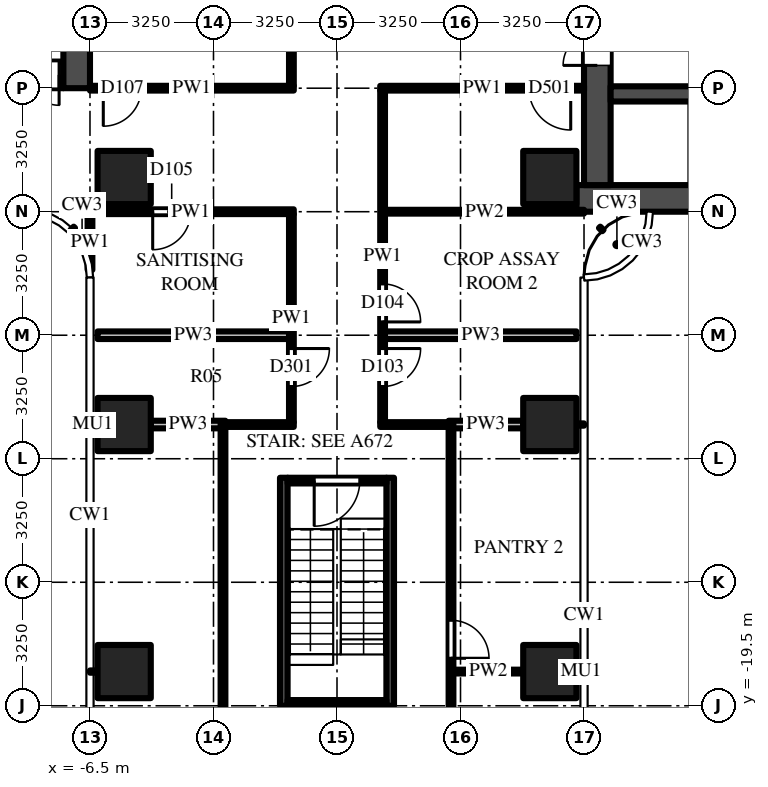
"""IFC4 building model, lengths in metres.
Left out: names, types, materials, properties, quantities, classifications, styles, units other than length and angle.
Written with IfcOpenShell. Run it as: python <this file> out.ifc"""

import sys

from ifc_helpers import new_model, si_unit, direction, frame, frame_2d, origin, origin_2d, place, context, subcontext, project, spatial, rectangle, extrude, source, transform, mapped, element, fill, save


model = new_model("IFC4")
c1 = context("Model", 3, precision=1e-05, world=origin(), true_north=direction((0.0, 1.0)))
c2 = subcontext(c1, "Body", "Model", "MODEL_VIEW")
j1 = project(units=[si_unit("LENGTHUNIT", "METRE"), si_unit("PLANEANGLEUNIT", "RADIAN")], contexts=[c1])
p1 = place(None, origin())
s1 = spatial("IfcSite", under=j1, at=p1, CompositionType="ELEMENT")
p2 = place(p1, origin())
s2 = spatial("IfcBuilding", under=s1, at=p2, CompositionType="ELEMENT")
p3 = place(p2, frame((0.0, 0.0, 52.0)))
s3 = spatial("IfcBuildingStorey", under=s2, at=p3, CompositionType="ELEMENT", Elevation=52.0)
m1 = source(origin(), c2, "Body", "SweptSolid", [
    extrude(rectangle(XDim=1.4, YDim=1.4, at=origin_2d()), origin(), (0.0, 0.0, 1.0), 4.5),
])
for number, where, z_axis, x_axis in (
    (1, (5.6, -5.6, 0.0), (0.0, 0.0, 1.0), (1.0, 0.0, 0.0)),
    (2, (-5.6, -5.6, 0.0), (0.0, 0.0, 1.0), (1.0, 0.0, 0.0)),
    (3, (5.6, -12.1, 0.0), (0.0, 0.0, 1.0), (1.0, 0.0, 0.0)),
    (4, (5.6, -18.6, 0.0), (0.0, 0.0, 1.0), (1.0, 0.0, 0.0)),
    (5, (-5.6, -12.1, 0.0), (0.0, 0.0, 1.0), (1.0, 0.0, 0.0)),
    (6, (-5.6, -18.6, 0.0), (0.0, 0.0, 1.0), (1.0, 0.0, 0.0)),
):
    element("IfcColumn", number, at=place(p3, frame(where, z_axis=z_axis, x_axis=x_axis)), inside=s3, PredefinedType="COLUMN", context=c2, shape_type="MappedRepresentation", body=[
        mapped(m1, transform((0.0, 0.0, 0.0))),
    ])
m2 = source(origin(), c2, "Body", "SweptSolid", [
    extrude(rectangle(XDim=16.45, YDim=0.7, at=frame_2d((8.225, 0.0))), origin(), (0.0, 0.0, 1.0), 4.25),
])
p4 = place(p3, frame((6.3, -6.15, 0.0), z_axis=(0.0, 0.0, 1.0), x_axis=(1.0, 0.0, 0.0)))
e7 = element("IfcWall", 7, at=p4, inside=s3, PredefinedType="SHEAR", context=c2, shape_type="MappedRepresentation", body=[
    mapped(m2, transform((0.0, 0.0, 0.0))),
])
m3 = source(origin(), c2, "Body", "SweptSolid", [
    extrude(rectangle(XDim=9.05, YDim=0.7, at=frame_2d((4.525, 0.0))), origin(), (0.0, 0.0, 1.0), 4.25),
])
p5 = place(p3, frame((6.85, -5.8, 0.0), z_axis=(0.0, 0.0, 1.0), x_axis=(0.0, 1.0, 0.0)))
e8 = element("IfcWall", 8, at=p5, inside=s3, PredefinedType="SHEAR", context=c2, shape_type="MappedRepresentation", body=[
    mapped(m3, transform((0.0, 0.0, 0.0))),
])
m4 = source(origin(), c2, "Body", "SweptSolid", [
    extrude(rectangle(XDim=1.8, YDim=2.1, at=frame_2d((0.9, 1.05))), frame((0.0, 0.36, 0.0), z_axis=(0.0, -1.0, 0.0), x_axis=(1.0, 0.0, 0.0)), (0.0, 0.0, 1.0), 0.72),
])
p6 = place(p5, frame((3.15, 0.0, 0.0)))
e9 = element("IfcOpeningElement", 9, at=p6, cuts=e8, PredefinedType="OPENING", context=c2, shape_type="MappedRepresentation", body=[
    mapped(m4, transform((0.0, 0.0, 0.0))),
])
m5 = source(origin(), c2, "Body", "SweptSolid", [
    extrude(rectangle(XDim=7.5, YDim=0.4, at=frame_2d((3.75, 0.0))), origin(), (0.0, 0.0, 1.0), 4.25),
])
p7 = place(p3, frame((7.2, -3.4, 0.0), z_axis=(0.0, 0.0, 1.0), x_axis=(1.0, 0.0, 0.0)))
e10 = element("IfcWall", 10, at=p7, inside=s3, PredefinedType="SHEAR", context=c2, shape_type="MappedRepresentation", body=[
    mapped(m5, transform((0.0, 0.0, 0.0))),
])
m6 = source(origin(), c2, "Body", "SweptSolid", [
    extrude(rectangle(XDim=1.1, YDim=2.1, at=frame_2d((0.55, 1.05))), frame((0.0, 0.21, 0.0), z_axis=(0.0, -1.0, 0.0), x_axis=(1.0, 0.0, 0.0)), (0.0, 0.0, 1.0), 0.42),
])
p8 = place(p7, frame((3.0, 0.0, 0.0)))
e11 = element("IfcOpeningElement", 11, at=p8, cuts=e10, PredefinedType="OPENING", context=c2, shape_type="MappedRepresentation", body=[
    mapped(m6, transform((0.0, 0.0, 0.0))),
])
p9 = place(p7, frame((5.5, 0.0, 0.0)))
e12 = element("IfcOpeningElement", 12, at=p9, cuts=e10, PredefinedType="OPENING", context=c2, shape_type="MappedRepresentation", body=[
    mapped(m6, transform((0.0, 0.0, 0.0))),
])
m7 = source(origin(), c2, "Body", "SweptSolid", [
    extrude(rectangle(XDim=14.85, YDim=0.7, at=frame_2d((7.425, 0.0))), origin(), (0.0, 0.0, 1.0), 4.25),
])
p10 = place(p3, frame((-7.2, -2.9, 0.0), z_axis=(0.0, 0.0, 1.0), x_axis=(-1.0, 0.0, 0.0)))
e13 = element("IfcWall", 13, at=p10, inside=s3, PredefinedType="SHEAR", context=c2, shape_type="MappedRepresentation", body=[
    mapped(m7, transform((0.0, 0.0, 0.0))),
])
m8 = source(origin(), c2, "Body", "SweptSolid", [
    extrude(rectangle(XDim=1.3, YDim=2.1, at=frame_2d((0.65, 1.05))), frame((0.0, 0.36, 0.0), z_axis=(0.0, -1.0, 0.0), x_axis=(1.0, 0.0, 0.0)), (0.0, 0.0, 1.0), 0.72),
])
p11 = place(p10, frame((12.2, 0.0, 0.0)))
e14 = element("IfcOpeningElement", 14, at=p11, cuts=e13, PredefinedType="OPENING", context=c2, shape_type="MappedRepresentation", body=[
    mapped(m8, transform((0.0, 0.0, 0.0))),
])
m9 = source(origin(), c2, "Body", "SweptSolid", [
    extrude(rectangle(XDim=1.2, YDim=2.1, at=frame_2d((0.6, 1.05))), frame((0.0, 0.36, 0.0), z_axis=(0.0, -1.0, 0.0), x_axis=(1.0, 0.0, 0.0)), (0.0, 0.0, 1.0), 0.72),
])
p12 = place(p10, frame((9.85, 0.0, 0.0)))
e15 = element("IfcOpeningElement", 15, at=p12, cuts=e13, PredefinedType="OPENING", context=c2, shape_type="MappedRepresentation", body=[
    mapped(m9, transform((0.0, 0.0, 0.0))),
])
m10 = source(origin(), c2, "Body", "SweptSolid", [
    extrude(rectangle(XDim=1.0, YDim=2.1, at=frame_2d((0.5, 1.05))), frame((0.0, 0.36, 0.0), z_axis=(0.0, -1.0, 0.0), x_axis=(1.0, 0.0, 0.0)), (0.0, 0.0, 1.0), 0.72),
])
p13 = place(p10, frame((7.9, 0.0, 0.0)))
e16 = element("IfcOpeningElement", 16, at=p13, cuts=e13, PredefinedType="OPENING", context=c2, shape_type="MappedRepresentation", body=[
    mapped(m10, transform((0.0, 0.0, 0.0))),
])
m11 = source(origin(), c2, "Body", "SweptSolid", [
    extrude(rectangle(XDim=0.8, YDim=2.1, at=frame_2d((0.4, 1.05))), frame((0.0, 0.36, 0.0), z_axis=(0.0, -1.0, 0.0), x_axis=(1.0, 0.0, 0.0)), (0.0, 0.0, 1.0), 0.72),
])
p14 = place(p10, frame((0.113, 0.0, 0.0)))
e17 = element("IfcOpeningElement", 17, at=p14, cuts=e13, PredefinedType="OPENING", context=c2, shape_type="MappedRepresentation", body=[
    mapped(m11, transform((0.0, 0.0, 0.0))),
])
p15 = place(p10, frame((1.288, 0.0, 0.0)))
e18 = element("IfcOpeningElement", 18, at=p15, cuts=e13, PredefinedType="OPENING", context=c2, shape_type="MappedRepresentation", body=[
    mapped(m11, transform((0.0, 0.0, 0.0))),
])
p16 = place(p10, frame((2.712, 0.0, 0.0)))
e19 = element("IfcOpeningElement", 19, at=p16, cuts=e13, PredefinedType="OPENING", context=c2, shape_type="MappedRepresentation", body=[
    mapped(m11, transform((0.0, 0.0, 0.0))),
])
p17 = place(p10, frame((3.887, 0.0, 0.0)))
e20 = element("IfcOpeningElement", 20, at=p17, cuts=e13, PredefinedType="OPENING", context=c2, shape_type="MappedRepresentation", body=[
    mapped(m11, transform((0.0, 0.0, 0.0))),
])
p18 = place(p10, frame((5.312, 0.0, 0.0)))
e21 = element("IfcOpeningElement", 21, at=p18, cuts=e13, PredefinedType="OPENING", context=c2, shape_type="MappedRepresentation", body=[
    mapped(m11, transform((0.0, 0.0, 0.0))),
])
p19 = place(p10, frame((6.488, 0.0, 0.0)))
e22 = element("IfcOpeningElement", 22, at=p19, cuts=e13, PredefinedType="OPENING", context=c2, shape_type="MappedRepresentation", body=[
    mapped(m11, transform((0.0, 0.0, 0.0))),
])
p20 = place(p3, frame((-6.85, 5.8, 0.0), z_axis=(0.0, 0.0, 1.0), x_axis=(0.0, -1.0, 0.0)))
e23 = element("IfcWall", 23, at=p20, inside=s3, PredefinedType="SHEAR", context=c2, shape_type="MappedRepresentation", body=[
    mapped(m3, transform((0.0, 0.0, 0.0))),
])
p21 = place(p20, frame((3.15, 0.0, 0.0)))
e24 = element("IfcOpeningElement", 24, at=p21, cuts=e23, PredefinedType="OPENING", context=c2, shape_type="MappedRepresentation", body=[
    mapped(m4, transform((0.0, 0.0, 0.0))),
])
m12 = source(origin(), c2, "Body", "SweptSolid", [
    extrude(rectangle(XDim=6.0, YDim=0.2, at=frame_2d((3.0, 0.0))), origin(), (0.0, 0.0, 1.0), 4.25),
])
for number, where, z_axis, x_axis in (
    (25, (1.4, -13.5, 0.0), (0.0, 0.0, 1.0), (0.0, -1.0, 0.0)),
    (26, (-1.4, -13.5, 0.0), (0.0, 0.0, 1.0), (0.0, -1.0, 0.0)),
):
    element("IfcWall", number, at=place(p3, frame(where, z_axis=z_axis, x_axis=x_axis)), inside=s3, PredefinedType="SHEAR", context=c2, shape_type="MappedRepresentation", body=[
        mapped(m12, transform((0.0, 0.0, 0.0))),
    ])
m13 = source(origin(), c2, "Body", "SweptSolid", [
    extrude(rectangle(XDim=2.6, YDim=0.15, at=frame_2d((1.3, 0.0))), origin(), (0.0, 0.0, 1.0), 4.25),
])
p22 = place(p3, frame((1.3, -13.575, 0.0), z_axis=(0.0, 0.0, 1.0), x_axis=(-1.0, 0.0, 0.0)))
e27 = element("IfcWall", 27, at=p22, inside=s3, PredefinedType="SHEAR", context=c2, shape_type="MappedRepresentation", body=[
    mapped(m13, transform((0.0, 0.0, 0.0))),
])
m14 = source(origin(), c2, "Body", "SweptSolid", [
    extrude(rectangle(XDim=1.2, YDim=2.1, at=frame_2d((0.6, 1.05))), frame((0.0, 0.085, 0.0), z_axis=(0.0, -1.0, 0.0), x_axis=(1.0, 0.0, 0.0)), (0.0, 0.0, 1.0), 0.17),
])
p23 = place(p22, frame((0.7, 0.0, 0.0)))
e28 = element("IfcOpeningElement", 28, at=p23, cuts=e27, PredefinedType="OPENING", context=c2, shape_type="MappedRepresentation", body=[
    mapped(m14, transform((0.0, 0.0, 0.0))),
])
p24 = place(p3, frame((1.3, -19.425, 0.0), z_axis=(0.0, 0.0, 1.0), x_axis=(-1.0, 0.0, 0.0)))
e29 = element("IfcWall", 29, at=p24, inside=s3, PredefinedType="SHEAR", context=c2, shape_type="MappedRepresentation", body=[
    mapped(m13, transform((0.0, 0.0, 0.0))),
])
m15 = source(origin(), c2, "Body", "SweptSolid", [
    extrude(rectangle(XDim=1.469, YDim=0.125, at=frame_2d((0.734, 0.0))), origin(), (0.0, 0.0, 1.0), 4.25),
])
p25 = place(p3, frame((-6.5, -6.562, 0.0), z_axis=(0.0, 0.0, 1.0), x_axis=(0.0, -1.0, 0.0)))
e30 = element("IfcWall", 30, at=p25, inside=s3, PredefinedType="PARTITIONING", context=c2, shape_type="MappedRepresentation", body=[
    mapped(m15, transform((0.0, 0.0, 0.0))),
])
m16 = source(origin(), c2, "Body", "SweptSolid", [
    extrude(rectangle(XDim=8.738, YDim=0.125, at=frame_2d((4.369, 0.0))), origin(), (0.0, 0.0, 1.0), 3.468),
])
p26 = place(p3, frame((-3.0, -20.938, 0.0), z_axis=(0.0, 0.0, 1.0), x_axis=(0.0, 1.0, 0.0)))
e31 = element("IfcWall", 31, at=p26, inside=s3, PredefinedType="PARTITIONING", context=c2, shape_type="MappedRepresentation", body=[
    mapped(m16, transform((0.0, 0.0, 0.0))),
])
m17 = source(origin(), c2, "Body", "SweptSolid", [
    extrude(rectangle(XDim=5.475, YDim=0.125, at=frame_2d((2.738, 0.0))), origin(), (0.0, 0.0, 1.0), 3.468),
])
p27 = place(p3, frame((-1.2, -6.562, 0.0), z_axis=(0.0, 0.0, 1.0), x_axis=(0.0, -1.0, 0.0)))
e32 = element("IfcWall", 32, at=p27, inside=s3, PredefinedType="PARTITIONING", context=c2, shape_type="MappedRepresentation", body=[
    mapped(m17, transform((0.0, 0.0, 0.0))),
])
m18 = source(origin(), c2, "Body", "SweptSolid", [
    extrude(rectangle(XDim=1.0, YDim=2.1, at=frame_2d((0.5, 1.05))), frame((0.0, 0.073, 0.0), z_axis=(0.0, -1.0, 0.0), x_axis=(1.0, 0.0, 0.0)), (0.0, 0.0, 1.0), 0.145),
])
p28 = place(p27, frame((3.538, 0.0, 0.0)))
e33 = element("IfcOpeningElement", 33, at=p28, cuts=e32, PredefinedType="OPENING", context=c2, shape_type="MappedRepresentation", body=[
    mapped(m18, transform((0.0, 0.0, 0.0))),
])
m19 = source(origin(), c2, "Body", "SweptSolid", [
    extrude(rectangle(XDim=3.125, YDim=0.125, at=frame_2d((1.562, 0.0))), origin(), (0.0, 0.0, 1.0), 3.546),
])
p29 = place(p3, frame((-1.2, -0.062, 0.0), z_axis=(0.0, 0.0, 1.0), x_axis=(0.0, -1.0, 0.0)))
e34 = element("IfcWall", 34, at=p29, inside=s3, PredefinedType="PARTITIONING", context=c2, shape_type="MappedRepresentation", body=[
    mapped(m19, transform((0.0, 0.0, 0.0))),
])
m20 = source(origin(), c2, "Body", "SweptSolid", [
    extrude(rectangle(XDim=8.725, YDim=0.125, at=frame_2d((4.363, 0.0))), origin(), (0.0, 0.0, 1.0), 3.468),
])
p30 = place(p3, frame((1.2, -3.312, 0.0), z_axis=(0.0, 0.0, 1.0), x_axis=(0.0, -1.0, 0.0)))
e35 = element("IfcWall", 35, at=p30, inside=s3, PredefinedType="PARTITIONING", context=c2, shape_type="MappedRepresentation", body=[
    mapped(m20, transform((0.0, 0.0, 0.0))),
])
p31 = place(p30, frame((6.788, 0.0, 0.0)))
e36 = element("IfcOpeningElement", 36, at=p31, cuts=e35, PredefinedType="OPENING", context=c2, shape_type="MappedRepresentation", body=[
    mapped(m18, transform((0.0, 0.0, 0.0))),
])
p32 = place(p30, frame((5.087, 0.0, 0.0)))
e37 = element("IfcOpeningElement", 37, at=p32, cuts=e35, PredefinedType="OPENING", context=c2, shape_type="MappedRepresentation", body=[
    mapped(m18, transform((0.0, 0.0, 0.0))),
])
p33 = place(p3, frame((3.0, -12.2, 0.0), z_axis=(0.0, 0.0, 1.0), x_axis=(0.0, -1.0, 0.0)))
e38 = element("IfcWall", 38, at=p33, inside=s3, PredefinedType="PARTITIONING", context=c2, shape_type="MappedRepresentation", body=[
    mapped(m16, transform((0.0, 0.0, 0.0))),
])
p34 = place(p33, frame((5.05, 0.0, 0.0)))
e39 = element("IfcOpeningElement", 39, at=p34, cuts=e38, PredefinedType="OPENING", context=c2, shape_type="MappedRepresentation", body=[
    mapped(m18, transform((0.0, 0.0, 0.0))),
])
m21 = source(origin(), c2, "Body", "SweptSolid", [
    extrude(rectangle(XDim=1.837, YDim=0.1, at=frame_2d((0.919, 0.0))), origin(), (0.0, 0.0, 1.0), 3.697),
])
p35 = place(p3, frame((3.062, -18.6, 0.0), z_axis=(0.0, 0.0, 1.0), x_axis=(1.0, 0.0, 0.0)))
e40 = element("IfcWall", 40, at=p35, inside=s3, PredefinedType="PARTITIONING", context=c2, shape_type="MappedRepresentation", body=[
    mapped(m21, transform((0.0, 0.0, 0.0))),
])
m22 = source(origin(), c2, "Body", "SweptSolid", [
    extrude(rectangle(XDim=1.962, YDim=0.2, at=frame_2d((0.981, 0.0))), origin(), (0.0, 0.0, 1.0), 3.468),
])
for number, where, z_axis, x_axis in (
    (41, (-4.9, -12.1, 0.0), (0.0, 0.0, 1.0), (1.0, 0.0, 0.0)),
    (42, (2.938, -12.1, 0.0), (0.0, 0.0, 1.0), (1.0, 0.0, 0.0)),
):
    element("IfcWall", number, at=place(p3, frame(where, z_axis=z_axis, x_axis=x_axis)), inside=s3, PredefinedType="PARTITIONING", context=c2, shape_type="MappedRepresentation", body=[
        mapped(m22, transform((0.0, 0.0, 0.0))),
    ])
m23 = source(origin(), c2, "Body", "SweptSolid", [
    extrude(rectangle(XDim=1.925, YDim=0.125, at=frame_2d((0.962, 0.0))), origin(), (0.0, 0.0, 1.0), 3.468),
])
for number, where, z_axis, x_axis in (
    (43, (-3.062, -12.1, 0.0), (0.0, 0.0, 1.0), (1.0, 0.0, 0.0)),
    (44, (1.137, -12.1, 0.0), (0.0, 0.0, 1.0), (1.0, 0.0, 0.0)),
):
    element("IfcWall", number, at=place(p3, frame(where, z_axis=z_axis, x_axis=x_axis)), inside=s3, PredefinedType="PARTITIONING", context=c2, shape_type="MappedRepresentation", body=[
        mapped(m23, transform((0.0, 0.0, 0.0))),
    ])
m24 = source(origin(), c2, "Body", "SweptSolid", [
    extrude(rectangle(XDim=5.038, YDim=0.2, at=frame_2d((2.519, 0.0))), origin(), (0.0, 0.0, 1.0), 3.33),
])
for number, where, z_axis, x_axis in (
    (45, (-6.3, -9.75, 0.0), (0.0, 0.0, 1.0), (1.0, 0.0, 0.0)),
    (46, (1.262, -9.75, 0.0), (0.0, 0.0, 1.0), (1.0, 0.0, 0.0)),
):
    element("IfcWall", number, at=place(p3, frame(where, z_axis=z_axis, x_axis=x_axis)), inside=s3, PredefinedType="PARTITIONING", context=c2, shape_type="MappedRepresentation", body=[
        mapped(m24, transform((0.0, 0.0, 0.0))),
    ])
m25 = source(origin(), c2, "Body", "SweptSolid", [
    extrude(rectangle(XDim=5.238, YDim=0.1, at=frame_2d((2.619, 0.0))), origin(), (0.0, 0.0, 1.0), 3.33),
])
p36 = place(p3, frame((1.262, -6.5, 0.0), z_axis=(0.0, 0.0, 1.0), x_axis=(1.0, 0.0, 0.0)))
e47 = element("IfcWall", 47, at=p36, inside=s3, PredefinedType="PARTITIONING", context=c2, shape_type="MappedRepresentation", body=[
    mapped(m25, transform((0.0, 0.0, 0.0))),
])
m26 = source(origin(), c2, "Body", "SweptSolid", [
    extrude(rectangle(XDim=5.425, YDim=0.125, at=frame_2d((2.712, 0.0))), origin(), (0.0, 0.0, 1.0), 3.33),
])
p37 = place(p3, frame((-1.137, -6.5, 0.0), z_axis=(0.0, 0.0, 1.0), x_axis=(-1.0, 0.0, 0.0)))
e48 = element("IfcWall", 48, at=p37, inside=s3, PredefinedType="PARTITIONING", context=c2, shape_type="MappedRepresentation", body=[
    mapped(m26, transform((0.0, 0.0, 0.0))),
])
p38 = place(p37, frame((2.712, 0.0, 0.0)))
e49 = element("IfcOpeningElement", 49, at=p38, cuts=e48, PredefinedType="OPENING", context=c2, shape_type="MappedRepresentation", body=[
    mapped(m18, transform((0.0, 0.0, 0.0))),
])
m27 = source(origin(), c2, "Body", "SweptSolid", [
    extrude(rectangle(XDim=5.363, YDim=0.125, at=frame_2d((2.681, 0.0))), origin(), (0.0, 0.0, 1.0), 3.468),
])
p39 = place(p3, frame((-1.137, -3.25, 0.0), z_axis=(0.0, 0.0, 1.0), x_axis=(-1.0, 0.0, 0.0)))
e50 = element("IfcWall", 50, at=p39, inside=s3, PredefinedType="PARTITIONING", context=c2, shape_type="MappedRepresentation", body=[
    mapped(m27, transform((0.0, 0.0, 0.0))),
])
p40 = place(p39, frame((4.012, 0.0, 0.0)))
e51 = element("IfcOpeningElement", 51, at=p40, cuts=e50, PredefinedType="OPENING", context=c2, shape_type="MappedRepresentation", body=[
    mapped(m18, transform((0.0, 0.0, 0.0))),
])
p41 = place(p3, frame((6.5, -3.25, 0.0), z_axis=(0.0, 0.0, 1.0), x_axis=(-1.0, 0.0, 0.0)))
e52 = element("IfcWall", 52, at=p41, inside=s3, PredefinedType="PARTITIONING", context=c2, shape_type="MappedRepresentation", body=[
    mapped(m27, transform((0.0, 0.0, 0.0))),
])
m28 = source(origin(), c2, "Body", "SweptSolid", [
    extrude(rectangle(XDim=1.1, YDim=2.1, at=frame_2d((0.55, 1.05))), frame((0.0, 0.073, 0.0), z_axis=(0.0, -1.0, 0.0), x_axis=(1.0, 0.0, 0.0)), (0.0, 0.0, 1.0), 0.145),
])
p42 = place(p41, frame((0.35, 0.0, 0.0)))
e53 = element("IfcOpeningElement", 53, at=p42, cuts=e52, PredefinedType="OPENING", context=c2, shape_type="MappedRepresentation", body=[
    mapped(m28, transform((0.0, 0.0, 0.0))),
])
m29 = source(origin(), c2, "Body", "SweptSolid", [
    extrude(rectangle(XDim=1.8, YDim=2.1, at=frame_2d((0.9, 1.05))), frame((0.0, -0.275, 0.0), z_axis=(0.0, -1.0, 0.0), x_axis=(1.0, 0.0, 0.0)), (0.0, 0.0, 1.0), 0.05),
])
p43 = place(p6, origin())
e54 = element("IfcDoor", 54, at=p43, inside=s3, OperationType="DOUBLE_DOOR_SINGLE_SWING", PredefinedType="DOOR", context=c2, shape_type="MappedRepresentation", body=[
    mapped(m29, transform((0.0, 0.0, 0.0))),
])
fill(e9, e54)
m30 = source(origin(), c2, "Body", "SweptSolid", [
    extrude(rectangle(XDim=0.8, YDim=2.1, at=frame_2d((0.4, 1.05))), frame((0.0, -0.275, 0.0), z_axis=(0.0, -1.0, 0.0), x_axis=(1.0, 0.0, 0.0)), (0.0, 0.0, 1.0), 0.05),
])
p44 = place(p14, origin())
e55 = element("IfcDoor", 55, at=p44, inside=s3, OperationType="SINGLE_SWING_LEFT", PredefinedType="DOOR", context=c2, shape_type="MappedRepresentation", body=[
    mapped(m30, transform((0.0, 0.0, 0.0))),
])
fill(e17, e55)
m31 = source(origin(), c2, "Body", "SweptSolid", [
    extrude(rectangle(XDim=1.2, YDim=2.1, at=frame_2d((0.6, 1.05))), frame((0.0, 0.025, 0.0), z_axis=(0.0, -1.0, 0.0), x_axis=(1.0, 0.0, 0.0)), (0.0, 0.0, 1.0), 0.05),
])
p45 = place(p23, origin())
e56 = element("IfcDoor", 56, at=p45, inside=s3, OperationType="SINGLE_SWING_RIGHT", PredefinedType="DOOR", context=c2, shape_type="MappedRepresentation", body=[
    mapped(m31, transform((0.0, 0.0, 0.0))),
])
fill(e28, e56)
m32 = source(origin(), c2, "Body", "SweptSolid", [
    extrude(rectangle(XDim=1.0, YDim=2.1, at=frame_2d((0.5, 1.05))), frame((0.0, 0.025, 0.0), z_axis=(0.0, -1.0, 0.0), x_axis=(1.0, 0.0, 0.0)), (0.0, 0.0, 1.0), 0.05),
])
p46 = place(p34, origin())
e57 = element("IfcDoor", 57, at=p46, inside=s3, OperationType="SINGLE_SWING_RIGHT", PredefinedType="DOOR", context=c2, shape_type="MappedRepresentation", body=[
    mapped(m32, transform((0.0, 0.0, 0.0))),
])
fill(e39, e57)
p47 = place(p28, origin())
e58 = element("IfcDoor", 58, at=p47, inside=s3, OperationType="SINGLE_SWING_LEFT", PredefinedType="DOOR", context=c2, shape_type="MappedRepresentation", body=[
    mapped(m32, transform((0.0, 0.0, 0.0))),
])
fill(e33, e58)
p48 = place(p31, origin())
e59 = element("IfcDoor", 59, at=p48, inside=s3, OperationType="SINGLE_SWING_LEFT", PredefinedType="DOOR", context=c2, shape_type="MappedRepresentation", body=[
    mapped(m32, transform((0.0, 0.0, 0.0))),
])
fill(e36, e59)
p49 = place(p32, origin())
e60 = element("IfcDoor", 60, at=p49, inside=s3, OperationType="SINGLE_SWING_RIGHT", PredefinedType="DOOR", context=c2, shape_type="MappedRepresentation", body=[
    mapped(m32, transform((0.0, 0.0, 0.0))),
])
fill(e37, e60)
p50 = place(p38, origin())
e61 = element("IfcDoor", 61, at=p50, inside=s3, OperationType="SINGLE_SWING_RIGHT", PredefinedType="DOOR", context=c2, shape_type="MappedRepresentation", body=[
    mapped(m32, transform((0.0, 0.0, 0.0))),
])
fill(e49, e61)
p51 = place(p40, origin())
e62 = element("IfcDoor", 62, at=p51, inside=s3, OperationType="SINGLE_SWING_RIGHT", PredefinedType="DOOR", context=c2, shape_type="MappedRepresentation", body=[
    mapped(m32, transform((0.0, 0.0, 0.0))),
])
fill(e51, e62)
m33 = source(origin(), c2, "Body", "SweptSolid", [
    extrude(rectangle(XDim=1.1, YDim=2.1, at=frame_2d((0.55, 1.05))), frame((0.0, 0.025, 0.0), z_axis=(0.0, -1.0, 0.0), x_axis=(1.0, 0.0, 0.0)), (0.0, 0.0, 1.0), 0.05),
])
p52 = place(p42, origin())
e63 = element("IfcDoor", 63, at=p52, inside=s3, OperationType="SINGLE_SWING_LEFT", PredefinedType="DOOR", context=c2, shape_type="MappedRepresentation", body=[
    mapped(m33, transform((0.0, 0.0, 0.0))),
])
fill(e53, e63)
save(model, sys.argv[1])
